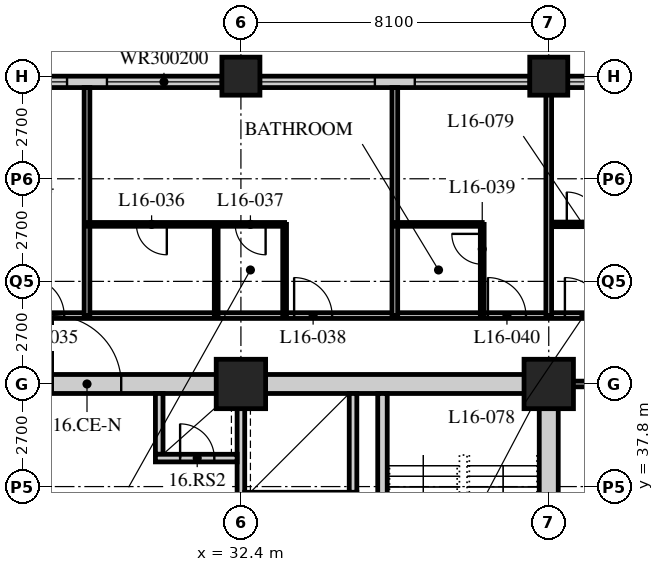
"""IFC4 building model, lengths in metres.
Left out: names, types, materials, properties, quantities, classifications, styles, units other than length and angle.
Written with IfcOpenShell. Run it as: python <this file> out.ifc"""

import sys

from ifc_helpers import new_model, si_unit, direction, frame, frame_2d, origin, origin_2d, place, context, subcontext, project, spatial, rectangle, hollow_rectangle, extrude, element, fill, save


model = new_model("IFC4")
c1 = context("Model", 3, precision=1e-05, world=origin(), true_north=direction((0.0, 1.0)))
c2 = subcontext(c1, "Body", "Model", "MODEL_VIEW")
j1 = project(units=[si_unit("LENGTHUNIT", "METRE"), si_unit("PLANEANGLEUNIT", "RADIAN")], contexts=[c1])
p1 = place(None, origin())
s1 = spatial("IfcSite", under=j1, at=p1, CompositionType="ELEMENT")
p2 = place(p1, origin())
s2 = spatial("IfcBuilding", under=s1, at=p2, CompositionType="ELEMENT")
p3 = place(p2, frame((0.0, 0.0, 67.0)))
s3 = spatial("IfcBuildingStorey", under=s2, at=p3, CompositionType="ELEMENT", Elevation=67.0)
p4 = place(p3, frame((32.4, 40.5, 0.0), z_axis=(0.0, 0.0, 1.0), x_axis=(1.0, 0.0, 0.0)))
e1 = element("IfcColumn", 1, at=p4, inside=s3, PredefinedType="COLUMN", context=c2, shape_type="SweptSolid", body=[
    extrude(hollow_rectangle(XDim=1.3, YDim=1.3, WallThickness=0.13, at=origin_2d()), origin(), (0.0, 0.0, 1.0), 3.4),
])
p5 = place(p3, frame((32.4, 48.6, 0.0), z_axis=(0.0, 0.0, 1.0), x_axis=(1.0, 0.0, 0.0)))
e2 = element("IfcColumn", 2, at=p5, inside=s3, PredefinedType="COLUMN", context=c2, shape_type="SweptSolid", body=[
    extrude(hollow_rectangle(XDim=1.0, YDim=1.0, WallThickness=0.1, at=origin_2d()), origin(), (0.0, 0.0, 1.0), 3.4),
])
p6 = place(p3, frame((40.5, 40.5, 0.0), z_axis=(0.0, 0.0, 1.0), x_axis=(1.0, 0.0, 0.0)))
e3 = element("IfcColumn", 3, at=p6, inside=s3, PredefinedType="COLUMN", context=c2, shape_type="SweptSolid", body=[
    extrude(hollow_rectangle(XDim=1.3, YDim=1.3, WallThickness=0.13, at=origin_2d()), origin(), (0.0, 0.0, 1.0), 3.4),
])
p7 = place(p3, frame((40.5, 48.6, 0.0), z_axis=(0.0, 0.0, 1.0), x_axis=(1.0, 0.0, 0.0)))
e4 = element("IfcColumn", 4, at=p7, inside=s3, PredefinedType="COLUMN", context=c2, shape_type="SweptSolid", body=[
    extrude(hollow_rectangle(XDim=1.0, YDim=1.0, WallThickness=0.1, at=origin_2d()), origin(), (0.0, 0.0, 1.0), 3.4),
])
p8 = place(p3, frame((48.3, 48.45, 0.0), z_axis=(0.0, 0.0, 1.0), x_axis=(-1.0, 0.0, 0.0)))
e5 = element("IfcWall", 5, at=p8, inside=s3, PredefinedType="SOLIDWALL", context=c2, shape_type="SweptSolid", body=[
    extrude(rectangle(XDim=40.2, YDim=0.3, at=frame_2d((20.1, 0.0))), origin(), (0.0, 0.0, 1.0), 3.19),
])
p9 = place(p8, frame((0.225, 0.0, 0.9)))
e6 = element("IfcOpeningElement", 6, at=p9, cuts=e5, PredefinedType="OPENING", context=c2, shape_type="SweptSolid", body=[
    extrude(rectangle(XDim=3.0, YDim=2.0, at=frame_2d((1.5, 1.0))), frame((0.0, 0.16, 0.0), z_axis=(0.0, -1.0, 0.0), x_axis=(1.0, 0.0, 0.0)), (0.0, 0.0, 1.0), 0.32),
])
p10 = place(p8, frame((4.275, 0.0, 0.9)))
e7 = element("IfcOpeningElement", 7, at=p10, cuts=e5, PredefinedType="OPENING", context=c2, shape_type="SweptSolid", body=[
    extrude(rectangle(XDim=3.0, YDim=2.0, at=frame_2d((1.5, 1.0))), frame((0.0, 0.16, 0.0), z_axis=(0.0, -1.0, 0.0), x_axis=(1.0, 0.0, 0.0)), (0.0, 0.0, 1.0), 0.32),
])
p11 = place(p8, frame((8.325, 0.0, 0.9)))
e8 = element("IfcOpeningElement", 8, at=p11, cuts=e5, PredefinedType="OPENING", context=c2, shape_type="SweptSolid", body=[
    extrude(rectangle(XDim=3.0, YDim=2.0, at=frame_2d((1.5, 1.0))), frame((0.0, 0.16, 0.0), z_axis=(0.0, -1.0, 0.0), x_axis=(1.0, 0.0, 0.0)), (0.0, 0.0, 1.0), 0.32),
])
p12 = place(p8, frame((12.375, 0.0, 0.9)))
e9 = element("IfcOpeningElement", 9, at=p12, cuts=e5, PredefinedType="OPENING", context=c2, shape_type="SweptSolid", body=[
    extrude(rectangle(XDim=3.0, YDim=2.0, at=frame_2d((1.5, 1.0))), frame((0.0, 0.16, 0.0), z_axis=(0.0, -1.0, 0.0), x_axis=(1.0, 0.0, 0.0)), (0.0, 0.0, 1.0), 0.32),
])
p13 = place(p8, frame((16.425, 0.0, 0.9)))
e10 = element("IfcOpeningElement", 10, at=p13, cuts=e5, PredefinedType="OPENING", context=c2, shape_type="SweptSolid", body=[
    extrude(rectangle(XDim=3.0, YDim=2.0, at=frame_2d((1.5, 1.0))), frame((0.0, 0.16, 0.0), z_axis=(0.0, -1.0, 0.0), x_axis=(1.0, 0.0, 0.0)), (0.0, 0.0, 1.0), 0.32),
])
p14 = place(p8, frame((20.475, 0.0, 0.9)))
e11 = element("IfcOpeningElement", 11, at=p14, cuts=e5, PredefinedType="OPENING", context=c2, shape_type="SweptSolid", body=[
    extrude(rectangle(XDim=3.0, YDim=2.0, at=frame_2d((1.5, 1.0))), frame((0.0, 0.16, 0.0), z_axis=(0.0, -1.0, 0.0), x_axis=(1.0, 0.0, 0.0)), (0.0, 0.0, 1.0), 0.32),
])
p15 = place(p8, frame((24.525, 0.0, 0.9)))
e12 = element("IfcOpeningElement", 12, at=p15, cuts=e5, PredefinedType="OPENING", context=c2, shape_type="SweptSolid", body=[
    extrude(rectangle(XDim=3.0, YDim=2.0, at=frame_2d((1.5, 1.0))), frame((0.0, 0.16, 0.0), z_axis=(0.0, -1.0, 0.0), x_axis=(1.0, 0.0, 0.0)), (0.0, 0.0, 1.0), 0.32),
])
p16 = place(p8, frame((28.575, 0.0, 0.9)))
e13 = element("IfcOpeningElement", 13, at=p16, cuts=e5, PredefinedType="OPENING", context=c2, shape_type="SweptSolid", body=[
    extrude(rectangle(XDim=3.0, YDim=2.0, at=frame_2d((1.5, 1.0))), frame((0.0, 0.16, 0.0), z_axis=(0.0, -1.0, 0.0), x_axis=(1.0, 0.0, 0.0)), (0.0, 0.0, 1.0), 0.32),
])
p17 = place(p8, frame((32.625, 0.0, 0.9)))
e14 = element("IfcOpeningElement", 14, at=p17, cuts=e5, PredefinedType="OPENING", context=c2, shape_type="SweptSolid", body=[
    extrude(rectangle(XDim=3.0, YDim=2.0, at=frame_2d((1.5, 1.0))), frame((0.0, 0.16, 0.0), z_axis=(0.0, -1.0, 0.0), x_axis=(1.0, 0.0, 0.0)), (0.0, 0.0, 1.0), 0.32),
])
p18 = place(p8, frame((36.675, 0.0, 0.9)))
e15 = element("IfcOpeningElement", 15, at=p18, cuts=e5, PredefinedType="OPENING", context=c2, shape_type="SweptSolid", body=[
    extrude(rectangle(XDim=3.0, YDim=2.0, at=frame_2d((1.5, 1.0))), frame((0.0, 0.16, 0.0), z_axis=(0.0, -1.0, 0.0), x_axis=(1.0, 0.0, 0.0)), (0.0, 0.0, 1.0), 0.32),
])
p19 = place(p3, frame((8.1, 42.3, 0.0), z_axis=(0.0, 0.0, 1.0), x_axis=(1.0, 0.0, 0.0)))
e16 = element("IfcWall", 16, at=p19, inside=s3, PredefinedType="PARTITIONING", context=c2, shape_type="SweptSolid", body=[
    extrude(rectangle(XDim=36.45, YDim=0.15, at=frame_2d((18.225, 0.0))), origin(), (0.0, 0.0, 1.0), 3.19),
])
p20 = place(p19, frame((9.5, 0.0, 0.0)))
e17 = element("IfcOpeningElement", 17, at=p20, cuts=e16, PredefinedType="OPENING", context=c2, shape_type="SweptSolid", body=[
    extrude(rectangle(XDim=1.0, YDim=2.1, at=frame_2d((0.5, 1.05))), frame((0.0, 0.085, 0.0), z_axis=(0.0, -1.0, 0.0), x_axis=(1.0, 0.0, 0.0)), (0.0, 0.0, 1.0), 0.17),
])
p21 = place(p19, frame((14.6, 0.0, 0.0)))
e18 = element("IfcOpeningElement", 18, at=p21, cuts=e16, PredefinedType="OPENING", context=c2, shape_type="SweptSolid", body=[
    extrude(rectangle(XDim=1.0, YDim=2.1, at=frame_2d((0.5, 1.05))), frame((0.0, 0.085, 0.0), z_axis=(0.0, -1.0, 0.0), x_axis=(1.0, 0.0, 0.0)), (0.0, 0.0, 1.0), 0.17),
])
p22 = place(p19, frame((18.65, 0.0, 0.0)))
e19 = element("IfcOpeningElement", 19, at=p22, cuts=e16, PredefinedType="OPENING", context=c2, shape_type="SweptSolid", body=[
    extrude(rectangle(XDim=1.0, YDim=2.1, at=frame_2d((0.5, 1.05))), frame((0.0, 0.085, 0.0), z_axis=(0.0, -1.0, 0.0), x_axis=(1.0, 0.0, 0.0)), (0.0, 0.0, 1.0), 0.17),
])
p23 = place(p19, frame((25.7, 0.0, 0.0)))
e20 = element("IfcOpeningElement", 20, at=p23, cuts=e16, PredefinedType="OPENING", context=c2, shape_type="SweptSolid", body=[
    extrude(rectangle(XDim=1.0, YDim=2.1, at=frame_2d((0.5, 1.05))), frame((0.0, 0.085, 0.0), z_axis=(0.0, -1.0, 0.0), x_axis=(1.0, 0.0, 0.0)), (0.0, 0.0, 1.0), 0.17),
])
p24 = place(p19, frame((30.8, 0.0, 0.0)))
e21 = element("IfcOpeningElement", 21, at=p24, cuts=e16, PredefinedType="OPENING", context=c2, shape_type="SweptSolid", body=[
    extrude(rectangle(XDim=1.0, YDim=2.1, at=frame_2d((0.5, 1.05))), frame((0.0, 0.085, 0.0), z_axis=(0.0, -1.0, 0.0), x_axis=(1.0, 0.0, 0.0)), (0.0, 0.0, 1.0), 0.17),
])
p25 = place(p19, frame((32.825, 0.0, 0.0)))
e22 = element("IfcOpeningElement", 22, at=p25, cuts=e16, PredefinedType="OPENING", context=c2, shape_type="SweptSolid", body=[
    extrude(rectangle(XDim=1.0, YDim=2.1, at=frame_2d((0.5, 1.05))), frame((0.0, 0.085, 0.0), z_axis=(0.0, -1.0, 0.0), x_axis=(1.0, 0.0, 0.0)), (0.0, 0.0, 1.0), 0.17),
])
p26 = place(p19, frame((2.625, 0.0, 0.0)))
e23 = element("IfcOpeningElement", 23, at=p26, cuts=e16, PredefinedType="OPENING", context=c2, shape_type="SweptSolid", body=[
    extrude(rectangle(XDim=1.0, YDim=2.1, at=frame_2d((0.5, 1.05))), frame((0.0, 0.085, 0.0), z_axis=(0.0, -1.0, 0.0), x_axis=(1.0, 0.0, 0.0)), (0.0, 0.0, 1.0), 0.17),
])
p27 = place(p3, frame((42.75, 40.5, 0.0), z_axis=(0.0, 0.0, 1.0), x_axis=(-1.0, 0.0, 0.0)))
e24 = element("IfcWall", 24, at=p27, inside=s3, PredefinedType="PARTITIONING", context=c2, shape_type="SweptSolid", body=[
    extrude(rectangle(XDim=2.05, YDim=0.15, at=frame_2d((1.025, 0.0))), origin(), (0.0, 0.0, 1.0), 2.578),
])
p28 = place(p3, frame((28.35, 42.3, 0.0), z_axis=(0.0, 0.0, 1.0), x_axis=(0.0, 1.0, 0.0)))
e25 = element("IfcWall", 25, at=p28, inside=s3, PredefinedType="PARTITIONING", context=c2, shape_type="SweptSolid", body=[
    extrude(rectangle(XDim=6.0, YDim=0.15, at=frame_2d((3.0, 0.0))), origin(), (0.0, 0.0, 1.0), 3.19),
])
p29 = place(p3, frame((28.35, 44.7, 0.0), z_axis=(0.0, 0.0, 1.0), x_axis=(1.0, 0.0, 0.0)))
e26 = element("IfcWall", 26, at=p29, inside=s3, PredefinedType="PARTITIONING", context=c2, shape_type="SweptSolid", body=[
    extrude(rectangle(XDim=5.2, YDim=0.1, at=frame_2d((2.6, 0.0))), origin(), (0.0, 0.0, 1.0), 3.19),
])
p30 = place(p29, frame((1.3, 0.0, 0.0)))
e27 = element("IfcOpeningElement", 27, at=p30, cuts=e26, PredefinedType="OPENING", context=c2, shape_type="SweptSolid", body=[
    extrude(rectangle(XDim=0.8, YDim=2.1, at=frame_2d((0.4, 1.05))), frame((0.0, 0.06, 0.0), z_axis=(0.0, -1.0, 0.0), x_axis=(1.0, 0.0, 0.0)), (0.0, 0.0, 1.0), 0.12),
])
p31 = place(p29, frame((3.9, 0.0, 0.0)))
e28 = element("IfcOpeningElement", 28, at=p31, cuts=e26, PredefinedType="OPENING", context=c2, shape_type="SweptSolid", body=[
    extrude(rectangle(XDim=0.8, YDim=2.1, at=frame_2d((0.4, 1.05))), frame((0.0, 0.06, 0.0), z_axis=(0.0, -1.0, 0.0), x_axis=(1.0, 0.0, 0.0)), (0.0, 0.0, 1.0), 0.12),
])
for number, where, z_axis, x_axis in (
    (29, (31.75, 42.3, 0.0), (0.0, 0.0, 1.0), (0.0, 1.0, 0.0)),
    (30, (33.55, 42.3, 0.0), (0.0, 0.0, 1.0), (0.0, 1.0, 0.0)),
):
    element("IfcWall", number, at=place(p3, frame(where, z_axis=z_axis, x_axis=x_axis)), inside=s3, PredefinedType="PARTITIONING", context=c2, shape_type="SweptSolid", body=[
        extrude(rectangle(XDim=2.4, YDim=0.1, at=frame_2d((1.2, 0.0))), origin(), (0.0, 0.0, 1.0), 3.19),
    ])
p32 = place(p3, frame((36.45, 42.3, 0.0), z_axis=(0.0, 0.0, 1.0), x_axis=(0.0, 1.0, 0.0)))
e31 = element("IfcWall", 31, at=p32, inside=s3, PredefinedType="PARTITIONING", context=c2, shape_type="SweptSolid", body=[
    extrude(rectangle(XDim=6.0, YDim=0.15, at=frame_2d((3.0, 0.0))), origin(), (0.0, 0.0, 1.0), 3.19),
])
p33 = place(p3, frame((36.45, 44.7, 0.0), z_axis=(0.0, 0.0, 1.0), x_axis=(1.0, 0.0, 0.0)))
e32 = element("IfcWall", 32, at=p33, inside=s3, PredefinedType="PARTITIONING", context=c2, shape_type="SweptSolid", body=[
    extrude(rectangle(XDim=2.3, YDim=0.1, at=frame_2d((1.15, 0.0))), origin(), (0.0, 0.0, 1.0), 3.19),
])
p34 = place(p3, frame((38.75, 42.3, 0.0), z_axis=(0.0, 0.0, 1.0), x_axis=(0.0, 1.0, 0.0)))
e33 = element("IfcWall", 33, at=p34, inside=s3, PredefinedType="PARTITIONING", context=c2, shape_type="SweptSolid", body=[
    extrude(rectangle(XDim=2.4, YDim=0.1, at=frame_2d((1.2, 0.0))), origin(), (0.0, 0.0, 1.0), 3.19),
])
p35 = place(p34, frame((1.35, 0.0, 0.0)))
e34 = element("IfcOpeningElement", 34, at=p35, cuts=e33, PredefinedType="OPENING", context=c2, shape_type="SweptSolid", body=[
    extrude(rectangle(XDim=0.8, YDim=2.1, at=frame_2d((0.4, 1.05))), frame((0.0, 0.06, 0.0), z_axis=(0.0, -1.0, 0.0), x_axis=(1.0, 0.0, 0.0)), (0.0, 0.0, 1.0), 0.12),
])
p36 = place(p3, frame((40.5, 44.7, 0.0), z_axis=(0.0, 0.0, 1.0), x_axis=(1.0, 0.0, 0.0)))
e35 = element("IfcWall", 35, at=p36, inside=s3, PredefinedType="PARTITIONING", context=c2, shape_type="SweptSolid", body=[
    extrude(rectangle(XDim=4.05, YDim=0.12, at=frame_2d((2.025, 0.0))), origin(), (0.0, 0.0, 1.0), 3.19),
])
p37 = place(p36, frame((0.475, 0.0, 0.0)))
e36 = element("IfcOpeningElement", 36, at=p37, cuts=e35, PredefinedType="OPENING", context=c2, shape_type="SweptSolid", body=[
    extrude(rectangle(XDim=0.85, YDim=2.1, at=frame_2d((0.425, 1.05))), frame((0.0, 0.07, 0.0), z_axis=(0.0, -1.0, 0.0), x_axis=(1.0, 0.0, 0.0)), (0.0, 0.0, 1.0), 0.14),
])
p38 = place(p3, frame((40.5, 42.3, 0.0), z_axis=(0.0, 0.0, 1.0), x_axis=(0.0, 1.0, 0.0)))
e37 = element("IfcWall", 37, at=p38, inside=s3, PredefinedType="PARTITIONING", context=c2, shape_type="SweptSolid", body=[
    extrude(rectangle(XDim=6.0, YDim=0.15, at=frame_2d((3.0, 0.0))), origin(), (0.0, 0.0, 1.0), 2.578),
])
p39 = place(p3, frame((15.95, 40.5, 0.0), z_axis=(0.0, 0.0, 1.0), x_axis=(1.0, 0.0, 0.0)))
e38 = element("IfcWall", 38, at=p39, inside=s3, PredefinedType="SOLIDWALL", context=c2, shape_type="SweptSolid", body=[
    extrude(rectangle(XDim=24.8, YDim=0.5, at=frame_2d((12.4, 0.0))), origin(), (0.0, 0.0, 1.0), 2.54),
])
p40 = place(p39, frame((11.5, 0.0, 0.0)))
e39 = element("IfcOpeningElement", 39, at=p40, cuts=e38, PredefinedType="OPENING", context=c2, shape_type="SweptSolid", body=[
    extrude(rectangle(XDim=1.8, YDim=2.4, at=frame_2d((0.9, 1.2))), frame((0.0, 0.26, 0.0), z_axis=(0.0, -1.0, 0.0), x_axis=(1.0, 0.0, 0.0)), (0.0, 0.0, 1.0), 0.52),
])
p41 = place(p3, frame((40.5, 24.55, 0.0), z_axis=(0.0, 0.0, 1.0), x_axis=(0.0, 1.0, 0.0)))
e40 = element("IfcWall", 40, at=p41, inside=s3, PredefinedType="SOLIDWALL", context=c2, shape_type="SweptSolid", body=[
    extrude(rectangle(XDim=15.7, YDim=0.5, at=frame_2d((7.85, 0.0))), origin(), (0.0, 0.0, 1.0), 2.578),
])
p42 = place(p3, frame((32.4, 32.5, 0.0), z_axis=(0.0, 0.0, 1.0), x_axis=(0.0, 1.0, 0.0)))
e41 = element("IfcWall", 41, at=p42, inside=s3, PredefinedType="SOLIDWALL", context=c2, shape_type="SweptSolid", body=[
    extrude(rectangle(XDim=7.75, YDim=0.2, at=frame_2d((3.875, 0.0))), origin(), (0.0, 0.0, 1.0), 2.578),
])
p43 = place(p42, frame((1.9, 0.0, 0.0)))
e42 = element("IfcOpeningElement", 42, at=p43, cuts=e41, PredefinedType="OPENING", context=c2, shape_type="SweptSolid", body=[
    extrude(rectangle(XDim=1.2, YDim=2.1, at=frame_2d((0.6, 1.05))), frame((0.0, 0.11, 0.0), z_axis=(0.0, -1.0, 0.0), x_axis=(1.0, 0.0, 0.0)), (0.0, 0.0, 1.0), 0.22),
])
p44 = place(p3, frame((36.125, 32.5, 0.0), z_axis=(0.0, 0.0, 1.0), x_axis=(0.0, 1.0, 0.0)))
e43 = element("IfcWall", 43, at=p44, inside=s3, PredefinedType="SOLIDWALL", context=c2, shape_type="SweptSolid", body=[
    extrude(rectangle(XDim=7.75, YDim=0.25, at=frame_2d((3.875, 0.0))), origin(), (0.0, 0.0, 1.0), 3.19),
])
p45 = place(p44, frame((0.45, 0.0, 0.0)))
e44 = element("IfcOpeningElement", 44, at=p45, cuts=e43, PredefinedType="OPENING", context=c2, shape_type="SweptSolid", body=[
    extrude(rectangle(XDim=1.2, YDim=2.1, at=frame_2d((0.6, 1.05))), frame((0.0, 0.135, 0.0), z_axis=(0.0, -1.0, 0.0), x_axis=(1.0, 0.0, 0.0)), (0.0, 0.0, 1.0), 0.27),
])
p46 = place(p3, frame((35.35, 37.65, 0.0), z_axis=(0.0, 0.0, 1.0), x_axis=(0.0, 1.0, 0.0)))
e45 = element("IfcWall", 45, at=p46, inside=s3, PredefinedType="SOLIDWALL", context=c2, shape_type="SweptSolid", body=[
    extrude(rectangle(XDim=2.6, YDim=0.2, at=frame_2d((1.3, 0.0))), origin(), (0.0, 0.0, 1.0), 3.19),
])
p47 = place(p3, frame((30.25, 38.65, 0.0), z_axis=(0.0, 0.0, 1.0), x_axis=(0.0, 1.0, 0.0)))
e46 = element("IfcWall", 46, at=p47, inside=s3, PredefinedType="SOLIDWALL", context=c2, shape_type="SweptSolid", body=[
    extrude(rectangle(XDim=1.6, YDim=0.2, at=frame_2d((0.8, 0.0))), origin(), (0.0, 0.0, 1.0), 3.19),
])
p48 = place(p3, frame((30.15, 38.55, 0.0), z_axis=(0.0, 0.0, 1.0), x_axis=(1.0, 0.0, 0.0)))
e47 = element("IfcWall", 47, at=p48, inside=s3, PredefinedType="SOLIDWALL", context=c2, shape_type="SweptSolid", body=[
    extrude(rectangle(XDim=2.15, YDim=0.2, at=frame_2d((1.075, 0.0))), origin(), (0.0, 0.0, 1.0), 3.19),
])
p49 = place(p48, frame((0.65, 0.0, 0.0)))
e48 = element("IfcOpeningElement", 48, at=p49, cuts=e47, PredefinedType="OPENING", context=c2, shape_type="SweptSolid", body=[
    extrude(rectangle(XDim=0.9, YDim=2.1, at=frame_2d((0.45, 1.05))), frame((0.0, 0.11, 0.0), z_axis=(0.0, -1.0, 0.0), x_axis=(1.0, 0.0, 0.0)), (0.0, 0.0, 1.0), 0.22),
])
p50 = place(p10, origin())
e49 = element("IfcWindow", 49, at=p50, inside=s3, PartitioningType="SINGLE_PANEL", PredefinedType="WINDOW", context=c2, shape_type="SweptSolid", body=[
    extrude(rectangle(XDim=3.0, YDim=2.0, at=frame_2d((1.5, 1.0))), frame((0.0, 0.03, 0.0), z_axis=(0.0, -1.0, 0.0), x_axis=(1.0, 0.0, 0.0)), (0.0, 0.0, 1.0), 0.06),
])
fill(e7, e49)
p51 = place(p11, origin())
e50 = element("IfcWindow", 50, at=p51, inside=s3, PartitioningType="SINGLE_PANEL", PredefinedType="WINDOW", context=c2, shape_type="SweptSolid", body=[
    extrude(rectangle(XDim=3.0, YDim=2.0, at=frame_2d((1.5, 1.0))), frame((0.0, 0.03, 0.0), z_axis=(0.0, -1.0, 0.0), x_axis=(1.0, 0.0, 0.0)), (0.0, 0.0, 1.0), 0.06),
])
fill(e8, e50)
p52 = place(p12, origin())
e51 = element("IfcWindow", 51, at=p52, inside=s3, PartitioningType="SINGLE_PANEL", PredefinedType="WINDOW", context=c2, shape_type="SweptSolid", body=[
    extrude(rectangle(XDim=3.0, YDim=2.0, at=frame_2d((1.5, 1.0))), frame((0.0, 0.03, 0.0), z_axis=(0.0, -1.0, 0.0), x_axis=(1.0, 0.0, 0.0)), (0.0, 0.0, 1.0), 0.06),
])
fill(e9, e51)
p53 = place(p13, origin())
e52 = element("IfcWindow", 52, at=p53, inside=s3, PartitioningType="SINGLE_PANEL", PredefinedType="WINDOW", context=c2, shape_type="SweptSolid", body=[
    extrude(rectangle(XDim=3.0, YDim=2.0, at=frame_2d((1.5, 1.0))), frame((0.0, 0.03, 0.0), z_axis=(0.0, -1.0, 0.0), x_axis=(1.0, 0.0, 0.0)), (0.0, 0.0, 1.0), 0.06),
])
fill(e10, e52)
p54 = place(p14, origin())
e53 = element("IfcWindow", 53, at=p54, inside=s3, PartitioningType="SINGLE_PANEL", PredefinedType="WINDOW", context=c2, shape_type="SweptSolid", body=[
    extrude(rectangle(XDim=3.0, YDim=2.0, at=frame_2d((1.5, 1.0))), frame((0.0, 0.03, 0.0), z_axis=(0.0, -1.0, 0.0), x_axis=(1.0, 0.0, 0.0)), (0.0, 0.0, 1.0), 0.06),
])
fill(e11, e53)
p55 = place(p22, origin())
e54 = element("IfcDoor", 54, at=p55, inside=s3, OperationType="SINGLE_SWING_LEFT", PredefinedType="DOOR", context=c2, shape_type="SweptSolid", body=[
    extrude(rectangle(XDim=1.0, YDim=2.1, at=frame_2d((0.5, 1.05))), frame((0.0, 0.025, 0.0), z_axis=(0.0, -1.0, 0.0), x_axis=(1.0, 0.0, 0.0)), (0.0, 0.0, 1.0), 0.05),
])
fill(e19, e54)
p56 = place(p30, origin())
e55 = element("IfcDoor", 55, at=p56, inside=s3, OperationType="SINGLE_SWING_LEFT", PredefinedType="DOOR", context=c2, shape_type="SweptSolid", body=[
    extrude(rectangle(XDim=0.8, YDim=2.1, at=frame_2d((0.4, 1.05))), frame((0.0, 0.025, 0.0), z_axis=(0.0, -1.0, 0.0), x_axis=(1.0, 0.0, 0.0)), (0.0, 0.0, 1.0), 0.05),
])
fill(e27, e55)
p57 = place(p31, origin())
e56 = element("IfcDoor", 56, at=p57, inside=s3, OperationType="SINGLE_SWING_LEFT", PredefinedType="DOOR", context=c2, shape_type="SweptSolid", body=[
    extrude(rectangle(XDim=0.8, YDim=2.1, at=frame_2d((0.4, 1.05))), frame((0.0, 0.025, 0.0), z_axis=(0.0, -1.0, 0.0), x_axis=(1.0, 0.0, 0.0)), (0.0, 0.0, 1.0), 0.05),
])
fill(e28, e56)
p58 = place(p23, origin())
e57 = element("IfcDoor", 57, at=p58, inside=s3, OperationType="SINGLE_SWING_LEFT", PredefinedType="DOOR", context=c2, shape_type="SweptSolid", body=[
    extrude(rectangle(XDim=1.0, YDim=2.1, at=frame_2d((0.5, 1.05))), frame((0.0, 0.025, 0.0), z_axis=(0.0, -1.0, 0.0), x_axis=(1.0, 0.0, 0.0)), (0.0, 0.0, 1.0), 0.05),
])
fill(e20, e57)
p59 = place(p35, origin())
e58 = element("IfcDoor", 58, at=p59, inside=s3, OperationType="SINGLE_SWING_RIGHT", PredefinedType="DOOR", context=c2, shape_type="SweptSolid", body=[
    extrude(rectangle(XDim=0.8, YDim=2.1, at=frame_2d((0.4, 1.05))), frame((0.0, 0.025, 0.0), z_axis=(0.0, -1.0, 0.0), x_axis=(1.0, 0.0, 0.0)), (0.0, 0.0, 1.0), 0.05),
])
fill(e34, e58)
p60 = place(p24, origin())
e59 = element("IfcDoor", 59, at=p60, inside=s3, OperationType="SINGLE_SWING_LEFT", PredefinedType="DOOR", context=c2, shape_type="SweptSolid", body=[
    extrude(rectangle(XDim=1.0, YDim=2.1, at=frame_2d((0.5, 1.05))), frame((0.0, 0.025, 0.0), z_axis=(0.0, -1.0, 0.0), x_axis=(1.0, 0.0, 0.0)), (0.0, 0.0, 1.0), 0.05),
])
fill(e21, e59)
p61 = place(p25, origin())
e60 = element("IfcDoor", 60, at=p61, inside=s3, OperationType="SINGLE_SWING_LEFT", PredefinedType="DOOR", context=c2, shape_type="SweptSolid", body=[
    extrude(rectangle(XDim=1.0, YDim=2.1, at=frame_2d((0.5, 1.05))), frame((0.0, 0.025, 0.0), z_axis=(0.0, -1.0, 0.0), x_axis=(1.0, 0.0, 0.0)), (0.0, 0.0, 1.0), 0.05),
])
fill(e22, e60)
p62 = place(p37, origin())
e61 = element("IfcDoor", 61, at=p62, inside=s3, OperationType="SINGLE_SWING_LEFT", PredefinedType="DOOR", context=c2, shape_type="SweptSolid", body=[
    extrude(rectangle(XDim=0.85, YDim=2.1, at=frame_2d((0.425, 1.05))), frame((0.0, 0.025, 0.0), z_axis=(0.0, -1.0, 0.0), x_axis=(1.0, 0.0, 0.0)), (0.0, 0.0, 1.0), 0.05),
])
fill(e36, e61)
p63 = place(p49, origin())
e62 = element("IfcDoor", 62, at=p63, inside=s3, OperationType="SINGLE_SWING_LEFT", PredefinedType="DOOR", context=c2, shape_type="SweptSolid", body=[
    extrude(rectangle(XDim=0.9, YDim=2.1, at=frame_2d((0.45, 1.05))), frame((0.0, 0.025, 0.0), z_axis=(0.0, -1.0, 0.0), x_axis=(1.0, 0.0, 0.0)), (0.0, 0.0, 1.0), 0.05),
])
fill(e48, e62)
p64 = place(p40, origin())
e63 = element("IfcDoor", 63, at=p64, inside=s3, OperationType="DOUBLE_DOOR_SINGLE_SWING", PredefinedType="DOOR", context=c2, shape_type="SweptSolid", body=[
    extrude(rectangle(XDim=1.8, YDim=2.4, at=frame_2d((0.9, 1.2))), frame((0.0, 0.025, 0.0), z_axis=(0.0, -1.0, 0.0), x_axis=(1.0, 0.0, 0.0)), (0.0, 0.0, 1.0), 0.05),
])
fill(e39, e63)
save(model, sys.argv[1])
